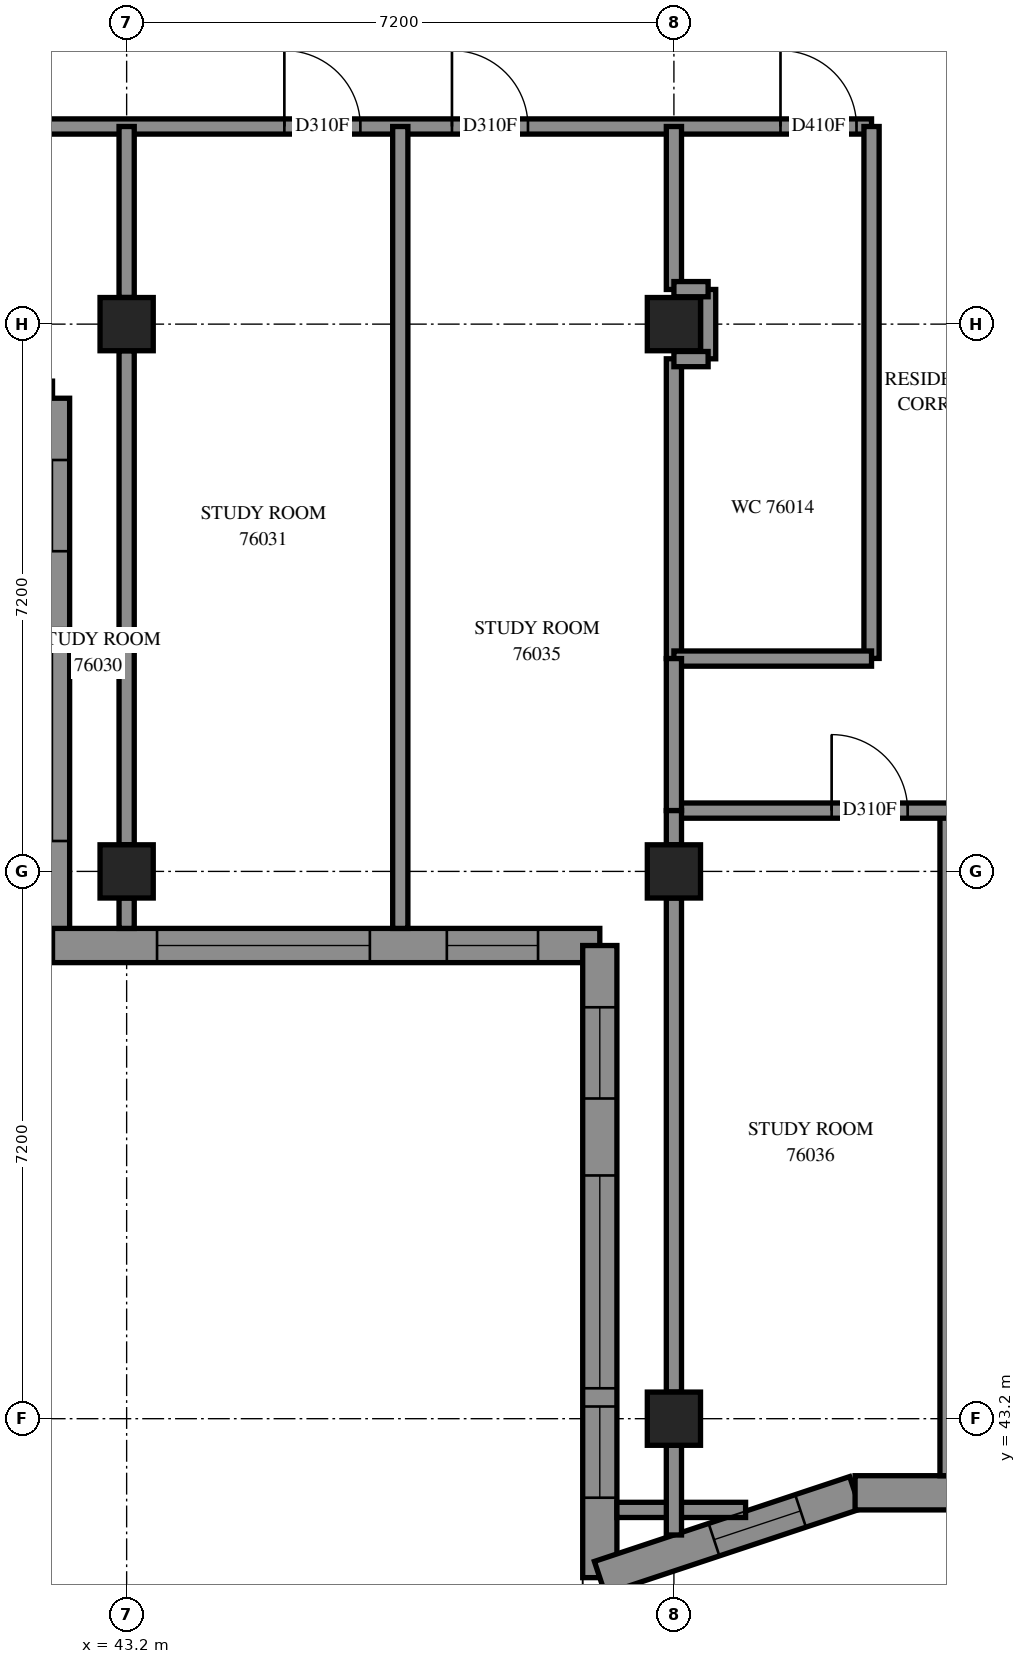
"""IFC4 building model, lengths in metres.
Left out: names, types, materials, properties, quantities, classifications, styles, units other than length and angle.
Written with IfcOpenShell. Run it as: python <this file> out.ifc"""

import sys

from ifc_helpers import new_model, si_unit, direction, frame, frame_2d, origin, origin_2d, place, context, subcontext, project, spatial, polyline, rectangle, outline, extrude, element, fill, save


model = new_model("IFC4")
c1 = context("Model", 3, precision=1e-05, world=origin(), true_north=direction((0.0, 1.0)))
c2 = subcontext(c1, "Body", "Model", "MODEL_VIEW")
j1 = project(units=[si_unit("LENGTHUNIT", "METRE"), si_unit("PLANEANGLEUNIT", "RADIAN")], contexts=[c1])
p1 = place(None, origin())
s1 = spatial("IfcSite", under=j1, at=p1, CompositionType="ELEMENT")
p2 = place(p1, origin())
s2 = spatial("IfcBuilding", under=s1, at=p2, CompositionType="ELEMENT")
p3 = place(p2, frame((0.0, 0.0, 277.8)))
s3 = spatial("IfcBuildingStorey", under=s2, at=p3, CompositionType="ELEMENT", Elevation=277.8)
for number, where, z_axis, x_axis in (
    (1, (43.2, 50.4, 0.0), (0.0, 0.0, 1.0), (1.0, 0.0, 0.0)),
    (2, (43.2, 57.6, 0.0), (0.0, 0.0, 1.0), (1.0, 0.0, 0.0)),
    (3, (50.4, 43.2, 0.0), (0.0, 0.0, 1.0), (1.0, 0.0, 0.0)),
    (4, (50.4, 50.4, 0.0), (0.0, 0.0, 1.0), (1.0, 0.0, 0.0)),
    (5, (50.4, 57.6, 0.0), (0.0, 0.0, 1.0), (1.0, 0.0, 0.0)),
):
    element("IfcColumn", number, at=place(p3, frame(where, z_axis=z_axis, x_axis=x_axis)), inside=s3, PredefinedType="COLUMN", context=c2, shape_type="SweptSolid", body=[
        extrude(rectangle(XDim=0.7, YDim=0.7, at=origin_2d()), origin(), (0.0, 0.0, 1.0), 3.1),
    ])
p4 = place(p3, frame((35.025, 56.625, 0.0), z_axis=(0.0, 0.0, 1.0), x_axis=(1.0, 0.0, 0.0)))
e6 = element("IfcWall", 6, at=p4, inside=s3, PredefinedType="SOLIDWALL", context=c2, shape_type="SweptSolid", body=[
    extrude(outline(polyline([(-0.225, -0.225), (6.975, -0.225), (7.425, 0.225), (0.225, 0.225), (-0.225, -0.225)])), origin(), (0.0, 0.0, 1.0), 3.1),
])
p5 = place(p4, frame((1.375, 0.0, 0.45)))
e7 = element("IfcOpeningElement", 7, at=p5, cuts=e6, PredefinedType="OPENING", context=c2, shape_type="SweptSolid", body=[
    extrude(rectangle(XDim=2.8, YDim=2.55, at=frame_2d((1.4, 1.275))), frame((0.0, 0.235, 0.0), z_axis=(0.0, -1.0, 0.0), x_axis=(1.0, 0.0, 0.0)), (0.0, 0.0, 1.0), 0.47),
])
p6 = place(p4, frame((5.188, 0.0, 0.45)))
e8 = element("IfcOpeningElement", 8, at=p6, cuts=e6, PredefinedType="OPENING", context=c2, shape_type="SweptSolid", body=[
    extrude(rectangle(XDim=1.2, YDim=2.55, at=frame_2d((0.6, 1.275))), frame((0.0, 0.235, 0.0), z_axis=(0.0, -1.0, 0.0), x_axis=(1.0, 0.0, 0.0)), (0.0, 0.0, 1.0), 0.47),
])
p7 = place(p3, frame((42.225, 56.625, 0.0), z_axis=(0.0, 0.0, 1.0), x_axis=(0.0, -1.0, 0.0)))
e9 = element("IfcWall", 9, at=p7, inside=s3, PredefinedType="SOLIDWALL", context=c2, shape_type="SweptSolid", body=[
    extrude(outline(polyline([(0.225, -0.225), (7.425, -0.225), (6.975, 0.225), (-0.225, 0.225), (0.225, -0.225)])), origin(), (0.0, 0.0, 1.0), 3.1),
])
p8 = place(p7, frame((3.025, 0.0, 0.45)))
e10 = element("IfcOpeningElement", 10, at=p8, cuts=e9, PredefinedType="OPENING", context=c2, shape_type="SweptSolid", body=[
    extrude(rectangle(XDim=2.8, YDim=2.55, at=frame_2d((1.4, 1.275))), frame((0.0, 0.235, 0.0), z_axis=(0.0, -1.0, 0.0), x_axis=(1.0, 0.0, 0.0)), (0.0, 0.0, 1.0), 0.47),
])
p9 = place(p7, frame((0.812, 0.0, 0.45)))
e11 = element("IfcOpeningElement", 11, at=p9, cuts=e9, PredefinedType="OPENING", context=c2, shape_type="SweptSolid", body=[
    extrude(rectangle(XDim=1.2, YDim=2.55, at=frame_2d((0.6, 1.275))), frame((0.0, 0.235, 0.0), z_axis=(0.0, -1.0, 0.0), x_axis=(1.0, 0.0, 0.0)), (0.0, 0.0, 1.0), 0.47),
])
p10 = place(p3, frame((42.225, 49.425, 0.0), z_axis=(0.0, 0.0, 1.0), x_axis=(1.0, 0.0, 0.0)))
e12 = element("IfcWall", 12, at=p10, inside=s3, PredefinedType="SOLIDWALL", context=c2, shape_type="SweptSolid", body=[
    extrude(outline(polyline([(-0.225, -0.225), (6.975, -0.225), (7.425, 0.225), (0.225, 0.225), (-0.225, -0.225)])), origin(), (0.0, 0.0, 1.0), 3.1),
])
p11 = place(p10, frame((1.375, 0.0, 0.45)))
e13 = element("IfcOpeningElement", 13, at=p11, cuts=e12, PredefinedType="OPENING", context=c2, shape_type="SweptSolid", body=[
    extrude(rectangle(XDim=2.8, YDim=2.55, at=frame_2d((1.4, 1.275))), frame((0.0, 0.235, 0.0), z_axis=(0.0, -1.0, 0.0), x_axis=(1.0, 0.0, 0.0)), (0.0, 0.0, 1.0), 0.47),
])
p12 = place(p10, frame((5.188, 0.0, 0.45)))
e14 = element("IfcOpeningElement", 14, at=p12, cuts=e12, PredefinedType="OPENING", context=c2, shape_type="SweptSolid", body=[
    extrude(rectangle(XDim=1.2, YDim=2.55, at=frame_2d((0.6, 1.275))), frame((0.0, 0.235, 0.0), z_axis=(0.0, -1.0, 0.0), x_axis=(1.0, 0.0, 0.0)), (0.0, 0.0, 1.0), 0.47),
])
p13 = place(p3, frame((49.425, 49.425, 0.0), z_axis=(0.0, 0.0, 1.0), x_axis=(0.0, -1.0, 0.0)))
e15 = element("IfcWall", 15, at=p13, inside=s3, PredefinedType="SOLIDWALL", context=c2, shape_type="SweptSolid", body=[
    extrude(outline(polyline([(0.225, -0.225), (8.628, -0.225), (8.004, 0.225), (-0.225, 0.225), (0.225, -0.225)])), origin(), (0.0, 0.0, 1.0), 3.1),
])
p14 = place(p13, frame((3.025, 0.0, 0.45)))
e16 = element("IfcOpeningElement", 16, at=p14, cuts=e15, PredefinedType="OPENING", context=c2, shape_type="SweptSolid", body=[
    extrude(rectangle(XDim=2.8, YDim=2.55, at=frame_2d((1.4, 1.275))), frame((0.0, 0.235, 0.0), z_axis=(0.0, -1.0, 0.0), x_axis=(1.0, 0.0, 0.0)), (0.0, 0.0, 1.0), 0.47),
])
p15 = place(p13, frame((0.812, 0.0, 0.45)))
e17 = element("IfcOpeningElement", 17, at=p15, cuts=e15, PredefinedType="OPENING", context=c2, shape_type="SweptSolid", body=[
    extrude(rectangle(XDim=1.2, YDim=2.55, at=frame_2d((0.6, 1.275))), frame((0.0, 0.235, 0.0), z_axis=(0.0, -1.0, 0.0), x_axis=(1.0, 0.0, 0.0)), (0.0, 0.0, 1.0), 0.47),
])
p16 = place(p13, frame((6.065, 0.0, 0.45)))
e18 = element("IfcOpeningElement", 18, at=p16, cuts=e15, PredefinedType="OPENING", context=c2, shape_type="SweptSolid", body=[
    extrude(rectangle(XDim=1.2, YDim=2.55, at=frame_2d((0.6, 1.275))), frame((0.0, 0.235, 0.0), z_axis=(0.0, -1.0, 0.0), x_axis=(1.0, 0.0, 0.0)), (0.0, 0.0, 1.0), 0.47),
])
p17 = place(p3, frame((49.425, 41.109, 0.0), z_axis=(0.0, 0.0, 1.0), x_axis=(0.9489711132, 0.3153630071, 0.0)))
e19 = element("IfcWall", 19, at=p17, inside=s3, PredefinedType="SOLIDWALL", context=c2, shape_type="SweptSolid", body=[
    extrude(outline(polyline([(-0.312, -0.225), (3.503, -0.225), (3.575, 0.225), (0.312, 0.225), (-0.312, -0.225)])), origin(), (0.0, 0.0, 1.0), 3.1),
])
p18 = place(p17, frame((1.583, 0.0, 0.45)))
e20 = element("IfcOpeningElement", 20, at=p18, cuts=e19, PredefinedType="OPENING", context=c2, shape_type="SweptSolid", body=[
    extrude(rectangle(XDim=1.2, YDim=2.55, at=frame_2d((0.6, 1.275))), frame((0.0, 0.235, 0.0), z_axis=(0.0, -1.0, 0.0), x_axis=(1.0, 0.0, 0.0)), (0.0, 0.0, 1.0), 0.47),
])
p19 = place(p3, frame((52.783, 42.225, 0.0), z_axis=(0.0, 0.0, 1.0), x_axis=(1.0, 0.0, 0.0)))
e21 = element("IfcWall", 21, at=p19, inside=s3, PredefinedType="SOLIDWALL", context=c2, shape_type="SweptSolid", body=[
    extrude(outline(polyline([(0.036, -0.225), (7.276, -0.225), (7.313, 0.225), (-0.036, 0.225), (0.036, -0.225)])), origin(), (0.0, 0.0, 1.0), 3.1),
])
p20 = place(p19, frame((1.617, 0.0, 0.45)))
e22 = element("IfcOpeningElement", 22, at=p20, cuts=e21, PredefinedType="OPENING", context=c2, shape_type="SweptSolid", body=[
    extrude(rectangle(XDim=2.8, YDim=2.55, at=frame_2d((1.4, 1.275))), frame((0.0, 0.235, 0.0), z_axis=(0.0, -1.0, 0.0), x_axis=(1.0, 0.0, 0.0)), (0.0, 0.0, 1.0), 0.47),
])
p21 = place(p19, frame((5.356, 0.0, 0.45)))
e23 = element("IfcOpeningElement", 23, at=p21, cuts=e21, PredefinedType="OPENING", context=c2, shape_type="SweptSolid", body=[
    extrude(rectangle(XDim=1.2, YDim=2.55, at=frame_2d((0.6, 1.275))), frame((0.0, 0.235, 0.0), z_axis=(0.0, -1.0, 0.0), x_axis=(1.0, 0.0, 0.0)), (0.0, 0.0, 1.0), 0.47),
])
p22 = place(p3, frame((36.0, 60.2, 0.0), z_axis=(0.0, 0.0, 1.0), x_axis=(1.0, 0.0, 0.0)))
e24 = element("IfcWall", 24, at=p22, inside=s3, PredefinedType="PARTITIONING", context=c2, shape_type="SweptSolid", body=[
    extrude(rectangle(XDim=17.0, YDim=0.2, at=frame_2d((8.5, 0.0))), origin(), (0.0, 0.0, 1.0), 3.1),
])
p23 = place(p22, frame((15.802, 0.0, 0.0)))
e25 = element("IfcOpeningElement", 25, at=p23, cuts=e24, PredefinedType="OPENING", context=c2, shape_type="SweptSolid", body=[
    extrude(rectangle(XDim=1.0, YDim=2.1, at=frame_2d((0.5, 1.05))), frame((0.0, 0.11, 0.0), z_axis=(0.0, -1.0, 0.0), x_axis=(1.0, 0.0, 0.0)), (0.0, 0.0, 1.0), 0.22),
])
p24 = place(p22, frame((2.075, 0.0, 0.0)))
e26 = element("IfcOpeningElement", 26, at=p24, cuts=e24, PredefinedType="OPENING", context=c2, shape_type="SweptSolid", body=[
    extrude(rectangle(XDim=1.0, YDim=2.1, at=frame_2d((0.5, 1.05))), frame((0.0, 0.11, 0.0), z_axis=(0.0, -1.0, 0.0), x_axis=(1.0, 0.0, 0.0)), (0.0, 0.0, 1.0), 0.22),
])
p25 = place(p22, frame((4.125, 0.0, 0.0)))
e27 = element("IfcOpeningElement", 27, at=p25, cuts=e24, PredefinedType="OPENING", context=c2, shape_type="SweptSolid", body=[
    extrude(rectangle(XDim=1.0, YDim=2.1, at=frame_2d((0.5, 1.05))), frame((0.0, 0.11, 0.0), z_axis=(0.0, -1.0, 0.0), x_axis=(1.0, 0.0, 0.0)), (0.0, 0.0, 1.0), 0.22),
])
p26 = place(p22, frame((9.275, 0.0, 0.0)))
e28 = element("IfcOpeningElement", 28, at=p26, cuts=e24, PredefinedType="OPENING", context=c2, shape_type="SweptSolid", body=[
    extrude(rectangle(XDim=1.0, YDim=2.1, at=frame_2d((0.5, 1.05))), frame((0.0, 0.11, 0.0), z_axis=(0.0, -1.0, 0.0), x_axis=(1.0, 0.0, 0.0)), (0.0, 0.0, 1.0), 0.22),
])
p27 = place(p22, frame((11.48, 0.0, 0.0)))
e29 = element("IfcOpeningElement", 29, at=p27, cuts=e24, PredefinedType="OPENING", context=c2, shape_type="SweptSolid", body=[
    extrude(rectangle(XDim=1.0, YDim=2.1, at=frame_2d((0.5, 1.05))), frame((0.0, 0.11, 0.0), z_axis=(0.0, -1.0, 0.0), x_axis=(1.0, 0.0, 0.0)), (0.0, 0.0, 1.0), 0.22),
])
p28 = place(p3, frame((46.8, 49.65, 0.0), z_axis=(0.0, 0.0, 1.0), x_axis=(0.0, 1.0, 0.0)))
e30 = element("IfcWall", 30, at=p28, inside=s3, PredefinedType="PARTITIONING", context=c2, shape_type="SweptSolid", body=[
    extrude(rectangle(XDim=10.55, YDim=0.2, at=frame_2d((5.275, 0.0))), origin(), (0.0, 0.0, 1.0), 3.1),
])
p29 = place(p3, frame((54.0, 42.45, 0.0), z_axis=(0.0, 0.0, 1.0), x_axis=(0.0, 1.0, 0.0)))
e31 = element("IfcWall", 31, at=p29, inside=s3, PredefinedType="PARTITIONING", context=c2, shape_type="SweptSolid", body=[
    extrude(rectangle(XDim=8.75, YDim=0.2, at=frame_2d((4.375, 0.0))), origin(), (0.0, 0.0, 1.0), 3.1),
])
p30 = place(p3, frame((53.0, 53.202, 0.0), z_axis=(0.0, 0.0, 1.0), x_axis=(0.0, 1.0, 0.0)))
e32 = element("IfcWall", 32, at=p30, inside=s3, PredefinedType="PARTITIONING", context=c2, shape_type="SweptSolid", body=[
    extrude(rectangle(XDim=6.998, YDim=0.2, at=frame_2d((3.499, 0.0))), origin(), (0.0, 0.0, 1.0), 3.1),
])
for number, where, z_axis, x_axis in (
    (33, (43.2, 50.75, 0.0), (0.0, 0.0, 1.0), (0.0, 1.0, 0.0)),
    (34, (50.4, 43.55, 0.0), (0.0, 0.0, 1.0), (0.0, 1.0, 0.0)),
):
    element("IfcWall", number, at=place(p3, frame(where, z_axis=z_axis, x_axis=x_axis)), inside=s3, PredefinedType="PARTITIONING", context=c2, shape_type="SweptSolid", body=[
        extrude(rectangle(XDim=6.5, YDim=0.2, at=frame_2d((3.25, 0.0))), origin(), (0.0, 0.0, 1.0), 2.6),
    ])
p31 = place(p3, frame((50.4, 51.2, 0.0), z_axis=(0.0, 0.0, 1.0), x_axis=(1.0, 0.0, 0.0)))
e35 = element("IfcWall", 35, at=p31, inside=s3, PredefinedType="PARTITIONING", context=c2, shape_type="SweptSolid", body=[
    extrude(rectangle(XDim=4.8, YDim=0.2, at=frame_2d((2.4, 0.0))), origin(), (0.0, 0.0, 1.0), 3.1),
])
p32 = place(p31, frame((2.075, 0.0, 0.0)))
e36 = element("IfcOpeningElement", 36, at=p32, cuts=e35, PredefinedType="OPENING", context=c2, shape_type="SweptSolid", body=[
    extrude(rectangle(XDim=1.0, YDim=2.1, at=frame_2d((0.5, 1.05))), frame((0.0, 0.11, 0.0), z_axis=(0.0, -1.0, 0.0), x_axis=(1.0, 0.0, 0.0)), (0.0, 0.0, 1.0), 0.22),
])
p33 = place(p3, frame((50.4, 53.2, 0.0), z_axis=(0.0, 0.0, 1.0), x_axis=(0.0, 1.0, 0.0)))
e37 = element("IfcWall", 37, at=p33, inside=s3, PredefinedType="PARTITIONING", context=c2, shape_type="SweptSolid", body=[
    extrude(rectangle(XDim=3.944, YDim=0.2, at=frame_2d((1.972, 0.0))), origin(), (0.0, 0.0, 1.0), 3.1),
])
p34 = place(p3, frame((50.4, 53.2, 0.0), z_axis=(0.0, 0.0, 1.0), x_axis=(1.0, 0.0, 0.0)))
e38 = element("IfcWall", 38, at=p34, inside=s3, PredefinedType="PARTITIONING", context=c2, shape_type="SweptSolid", body=[
    extrude(rectangle(XDim=2.6, YDim=0.2, at=frame_2d((1.3, 0.0))), origin(), (0.0, 0.0, 1.0), 3.1),
])
p35 = place(p3, frame((43.2, 57.95, 0.0), z_axis=(0.0, 0.0, 1.0), x_axis=(0.0, 1.0, 0.0)))
e39 = element("IfcWall", 39, at=p35, inside=s3, PredefinedType="PARTITIONING", context=c2, shape_type="SweptSolid", body=[
    extrude(rectangle(XDim=2.25, YDim=0.2, at=frame_2d((1.125, 0.0))), origin(), (0.0, 0.0, 1.0), 3.1),
])
p36 = place(p3, frame((50.4, 58.056, 0.0), z_axis=(0.0, 0.0, 1.0), x_axis=(0.0, 1.0, 0.0)))
e40 = element("IfcWall", 40, at=p36, inside=s3, PredefinedType="PARTITIONING", context=c2, shape_type="SweptSolid", body=[
    extrude(rectangle(XDim=2.144, YDim=0.2, at=frame_2d((1.072, 0.0))), origin(), (0.0, 0.0, 1.0), 3.1),
])
p37 = place(p3, frame((50.4, 51.2, 0.0), z_axis=(0.0, 0.0, 1.0), x_axis=(0.0, 1.0, 0.0)))
e41 = element("IfcWall", 41, at=p37, inside=s3, PredefinedType="PARTITIONING", context=c2, shape_type="SweptSolid", body=[
    extrude(rectangle(XDim=2.0, YDim=0.2, at=frame_2d((1.0, 0.0))), origin(), (0.0, 0.0, 1.0), 3.1),
])
p38 = place(p3, frame((49.65, 42.0, 0.0), z_axis=(0.0, 0.0, 1.0), x_axis=(1.0, 0.0, 0.0)))
e42 = element("IfcWall", 42, at=p38, inside=s3, PredefinedType="PARTITIONING", context=c2, shape_type="SweptSolid", body=[
    extrude(rectangle(XDim=1.693, YDim=0.2, at=frame_2d((0.847, 0.0))), origin(), (0.0, 0.0, 1.0), 3.1),
])
p39 = place(p3, frame((50.85, 57.144, 0.0), z_axis=(0.0, 0.0, 1.0), x_axis=(0.0, 1.0, 0.0)))
e43 = element("IfcWall", 43, at=p39, inside=s3, PredefinedType="PARTITIONING", context=c2, shape_type="SweptSolid", body=[
    extrude(rectangle(XDim=0.912, YDim=0.2, at=frame_2d((0.456, 0.0))), origin(), (0.0, 0.0, 1.0), 3.1),
])
p40 = place(p3, frame((50.4, 41.67, 0.0), z_axis=(0.0, 0.0, 1.0), x_axis=(0.0, 1.0, 0.0)))
e44 = element("IfcWall", 44, at=p40, inside=s3, PredefinedType="PARTITIONING", context=c2, shape_type="SweptSolid", body=[
    extrude(rectangle(XDim=1.18, YDim=0.2, at=frame_2d((0.59, 0.0))), origin(), (0.0, 0.0, 1.0), 3.1),
])
for number, where, z_axis, x_axis in (
    (45, (50.4, 50.75, 0.0), (0.0, 0.0, 1.0), (0.0, 1.0, 0.0)),
    (46, (50.4, 57.14, 0.0), (0.0, 0.0, 1.0), (1.0, 0.0, 0.0)),
    (47, (50.4, 58.06, 0.0), (0.0, 0.0, 1.0), (1.0, 0.0, 0.0)),
):
    element("IfcWall", number, at=place(p3, frame(where, z_axis=z_axis, x_axis=x_axis)), inside=s3, PredefinedType="PARTITIONING", context=c2, shape_type="SweptSolid", body=[
        extrude(rectangle(XDim=0.45, YDim=0.2, at=frame_2d((0.225, 0.0))), origin(), (0.0, 0.0, 1.0), 3.1),
    ])
p41 = place(p3, frame((43.2, 49.65, 0.0), z_axis=(0.0, 0.0, 1.0), x_axis=(0.0, 1.0, 0.0)))
e48 = element("IfcWall", 48, at=p41, inside=s3, PredefinedType="PARTITIONING", context=c2, shape_type="SweptSolid", body=[
    extrude(rectangle(XDim=0.4, YDim=0.2, at=frame_2d((0.2, 0.0))), origin(), (0.0, 0.0, 1.0), 3.1),
])
p42 = place(p8, origin())
e49 = element("IfcWindow", 49, at=p42, inside=s3, PartitioningType="SINGLE_PANEL", PredefinedType="WINDOW", context=c2, shape_type="SweptSolid", body=[
    extrude(rectangle(XDim=2.8, YDim=2.55, at=frame_2d((1.4, 1.275))), frame((0.0, 0.205, 0.0), z_axis=(0.0, -1.0, 0.0), x_axis=(1.0, 0.0, 0.0)), (0.0, 0.0, 1.0), 0.06),
])
fill(e10, e49)
p43 = place(p9, origin())
e50 = element("IfcWindow", 50, at=p43, inside=s3, PartitioningType="SINGLE_PANEL", PredefinedType="WINDOW", context=c2, shape_type="SweptSolid", body=[
    extrude(rectangle(XDim=1.2, YDim=2.55, at=frame_2d((0.6, 1.275))), frame((0.0, 0.205, 0.0), z_axis=(0.0, -1.0, 0.0), x_axis=(1.0, 0.0, 0.0)), (0.0, 0.0, 1.0), 0.06),
])
fill(e11, e50)
p44 = place(p11, origin())
e51 = element("IfcWindow", 51, at=p44, inside=s3, PartitioningType="SINGLE_PANEL", PredefinedType="WINDOW", context=c2, shape_type="SweptSolid", body=[
    extrude(rectangle(XDim=2.8, YDim=2.55, at=frame_2d((1.4, 1.275))), frame((0.0, 0.205, 0.0), z_axis=(0.0, -1.0, 0.0), x_axis=(1.0, 0.0, 0.0)), (0.0, 0.0, 1.0), 0.06),
])
fill(e13, e51)
p45 = place(p12, origin())
e52 = element("IfcWindow", 52, at=p45, inside=s3, PartitioningType="SINGLE_PANEL", PredefinedType="WINDOW", context=c2, shape_type="SweptSolid", body=[
    extrude(rectangle(XDim=1.2, YDim=2.55, at=frame_2d((0.6, 1.275))), frame((0.0, 0.205, 0.0), z_axis=(0.0, -1.0, 0.0), x_axis=(1.0, 0.0, 0.0)), (0.0, 0.0, 1.0), 0.06),
])
fill(e14, e52)
p46 = place(p14, origin())
e53 = element("IfcWindow", 53, at=p46, inside=s3, PartitioningType="SINGLE_PANEL", PredefinedType="WINDOW", context=c2, shape_type="SweptSolid", body=[
    extrude(rectangle(XDim=2.8, YDim=2.55, at=frame_2d((1.4, 1.275))), frame((0.0, 0.205, 0.0), z_axis=(0.0, -1.0, 0.0), x_axis=(1.0, 0.0, 0.0)), (0.0, 0.0, 1.0), 0.06),
])
fill(e16, e53)
p47 = place(p15, origin())
e54 = element("IfcWindow", 54, at=p47, inside=s3, PartitioningType="SINGLE_PANEL", PredefinedType="WINDOW", context=c2, shape_type="SweptSolid", body=[
    extrude(rectangle(XDim=1.2, YDim=2.55, at=frame_2d((0.6, 1.275))), frame((0.0, 0.205, 0.0), z_axis=(0.0, -1.0, 0.0), x_axis=(1.0, 0.0, 0.0)), (0.0, 0.0, 1.0), 0.06),
])
fill(e17, e54)
p48 = place(p16, origin())
e55 = element("IfcWindow", 55, at=p48, inside=s3, PartitioningType="SINGLE_PANEL", PredefinedType="WINDOW", context=c2, shape_type="SweptSolid", body=[
    extrude(rectangle(XDim=1.2, YDim=2.55, at=frame_2d((0.6, 1.275))), frame((0.0, 0.205, 0.0), z_axis=(0.0, -1.0, 0.0), x_axis=(1.0, 0.0, 0.0)), (0.0, 0.0, 1.0), 0.06),
])
fill(e18, e55)
p49 = place(p18, origin())
e56 = element("IfcWindow", 56, at=p49, inside=s3, PartitioningType="SINGLE_PANEL", PredefinedType="WINDOW", context=c2, shape_type="SweptSolid", body=[
    extrude(rectangle(XDim=1.2, YDim=2.55, at=frame_2d((0.6, 1.275))), frame((0.0, 0.115, 0.0), z_axis=(0.0, -1.0, 0.0), x_axis=(1.0, 0.0, 0.0)), (0.0, 0.0, 1.0), 0.06),
])
fill(e20, e56)
p50 = place(p23, origin())
e57 = element("IfcDoor", 57, at=p50, inside=s3, OperationType="SINGLE_SWING_LEFT", PredefinedType="DOOR", context=c2, shape_type="SweptSolid", body=[
    extrude(rectangle(XDim=1.0, YDim=2.1, at=frame_2d((0.5, 1.05))), frame((0.0, 0.025, 0.0), z_axis=(0.0, -1.0, 0.0), x_axis=(1.0, 0.0, 0.0)), (0.0, 0.0, 1.0), 0.05),
])
fill(e25, e57)
p51 = place(p26, origin())
e58 = element("IfcDoor", 58, at=p51, inside=s3, OperationType="SINGLE_SWING_LEFT", PredefinedType="DOOR", context=c2, shape_type="SweptSolid", body=[
    extrude(rectangle(XDim=1.0, YDim=2.1, at=frame_2d((0.5, 1.05))), frame((0.0, 0.025, 0.0), z_axis=(0.0, -1.0, 0.0), x_axis=(1.0, 0.0, 0.0)), (0.0, 0.0, 1.0), 0.05),
])
fill(e28, e58)
p52 = place(p27, origin())
e59 = element("IfcDoor", 59, at=p52, inside=s3, OperationType="SINGLE_SWING_RIGHT", PredefinedType="DOOR", context=c2, shape_type="SweptSolid", body=[
    extrude(rectangle(XDim=1.0, YDim=2.1, at=frame_2d((0.5, 1.05))), frame((0.0, 0.025, 0.0), z_axis=(0.0, -1.0, 0.0), x_axis=(1.0, 0.0, 0.0)), (0.0, 0.0, 1.0), 0.05),
])
fill(e29, e59)
p53 = place(p32, origin())
e60 = element("IfcDoor", 60, at=p53, inside=s3, OperationType="SINGLE_SWING_LEFT", PredefinedType="DOOR", context=c2, shape_type="SweptSolid", body=[
    extrude(rectangle(XDim=1.0, YDim=2.1, at=frame_2d((0.5, 1.05))), frame((0.0, 0.025, 0.0), z_axis=(0.0, -1.0, 0.0), x_axis=(1.0, 0.0, 0.0)), (0.0, 0.0, 1.0), 0.05),
])
fill(e36, e60)
save(model, sys.argv[1])
